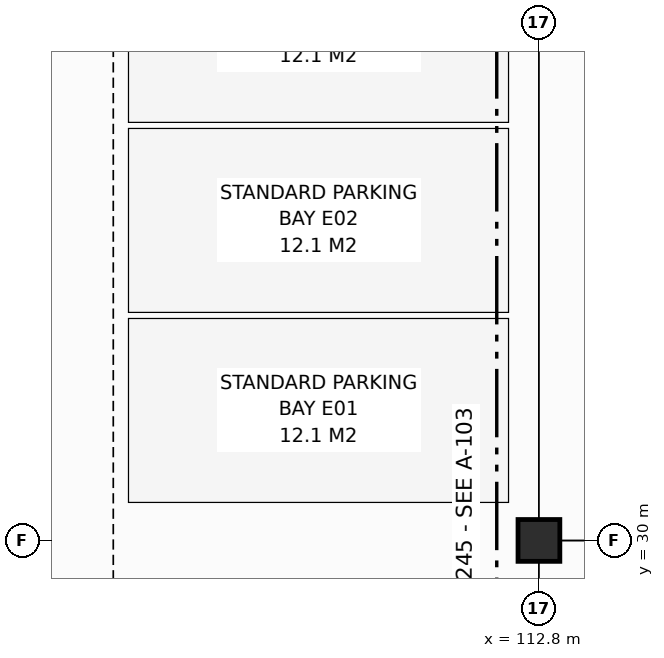
"""IFC4 building model, lengths in metres.
Left out: names, types, materials, properties, quantities, classifications, styles, units other than length and angle.
Written with IfcOpenShell. Run it as: python <this file> out.ifc"""

import sys

from ifc_helpers import new_model, si_unit, direction, frame, origin, origin_2d, place, context, subcontext, project, spatial, rectangle, extrude, element, save


model = new_model("IFC4")
c1 = context("Model", 3, precision=1e-05, world=origin(), true_north=direction((0.0, 1.0)))
c2 = subcontext(c1, "Body", "Model", "MODEL_VIEW")
j1 = project(units=[si_unit("LENGTHUNIT", "METRE"), si_unit("PLANEANGLEUNIT", "RADIAN")], contexts=[c1])
p1 = place(None, origin())
s1 = spatial("IfcSite", under=j1, at=p1, CompositionType="ELEMENT")
p2 = place(p1, origin())
s2 = spatial("IfcBuilding", under=s1, at=p2, CompositionType="ELEMENT")
p3 = place(p2, frame((0.0, 0.0, -3.8)))
s3 = spatial("IfcBuildingStorey", under=s2, at=p3, CompositionType="ELEMENT", Elevation=-3.8)
p4 = place(p3, frame((112.8, 30.0, 0.0), z_axis=(0.0, 0.0, 1.0), x_axis=(1.0, 0.0, 0.0)))
e1 = element("IfcColumn", 1, at=p4, inside=s3, PredefinedType="COLUMN", context=c2, shape_type="SweptSolid", body=[
    extrude(rectangle(XDim=0.55, YDim=0.55, at=origin_2d()), origin(), (0.0, 0.0, 1.0), 3.8),
])
save(model, sys.argv[1])
